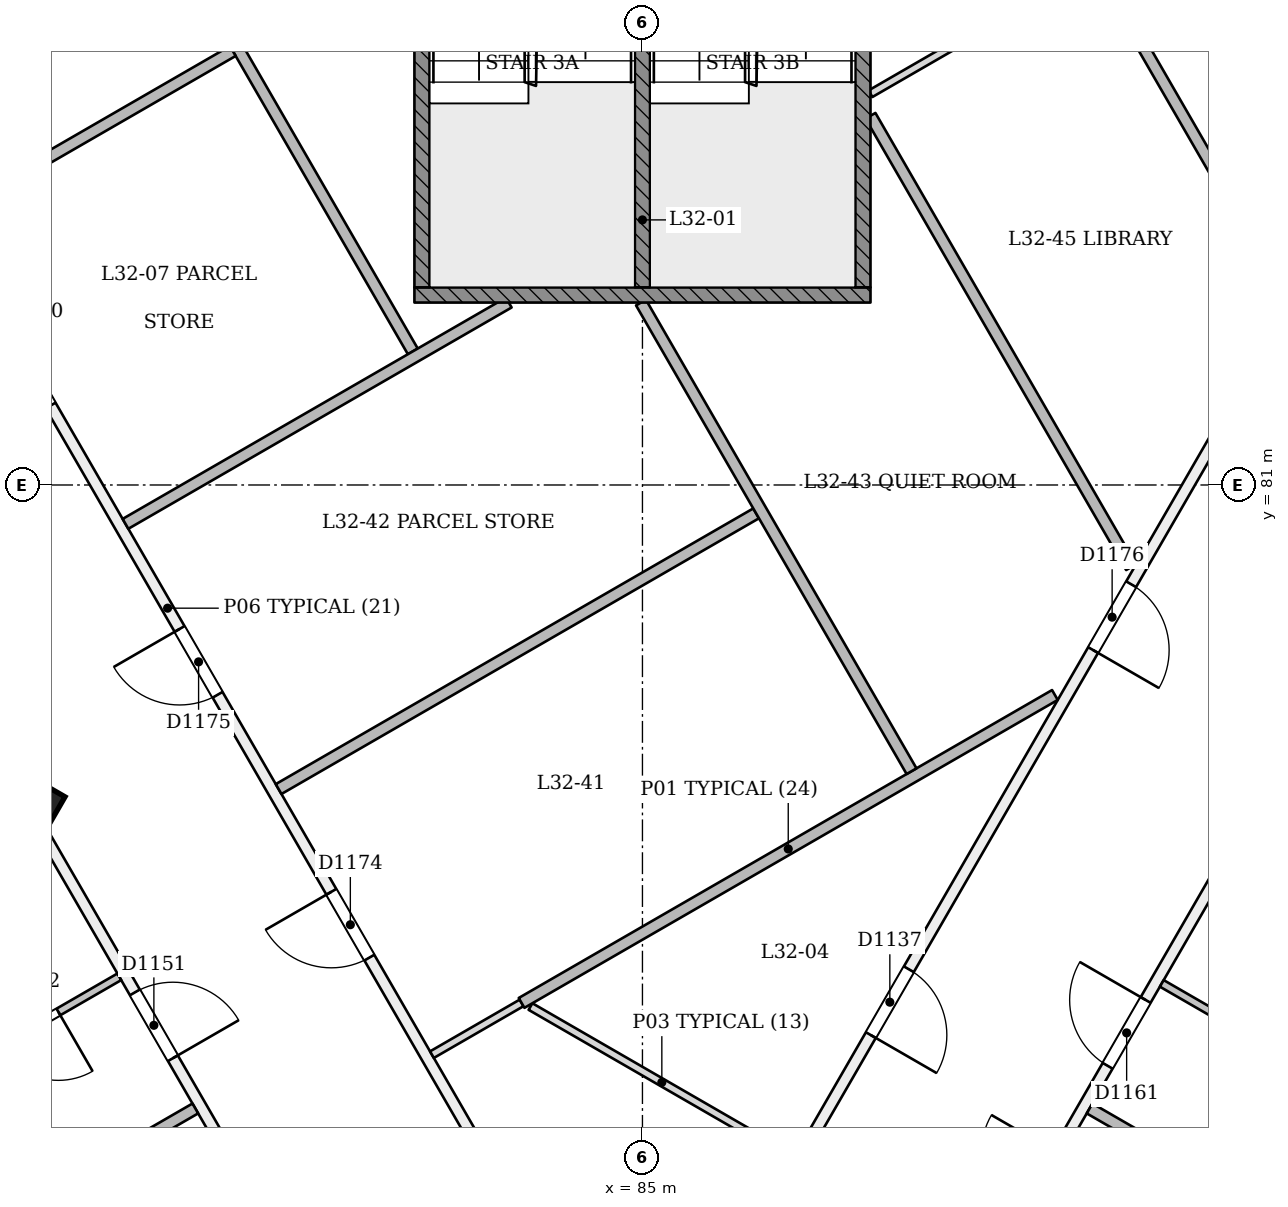
"""IFC4 building model, lengths in metres.
Left out: names, types, materials, properties, quantities, classifications, styles, units other than length and angle.
Written with IfcOpenShell. Run it as: python <this file> out.ifc"""

import sys

from ifc_helpers import new_model, si_unit, direction, frame, frame_2d, origin, origin_2d, place, context, subcontext, project, spatial, rectangle, extrude, element, fill, save


model = new_model("IFC4")
c1 = context("Model", 3, precision=1e-05, world=origin(), true_north=direction((0.0, 1.0)))
c2 = subcontext(c1, "Body", "Model", "MODEL_VIEW")
j1 = project(units=[si_unit("LENGTHUNIT", "METRE"), si_unit("PLANEANGLEUNIT", "RADIAN")], contexts=[c1])
p1 = place(None, origin())
s1 = spatial("IfcSite", under=j1, at=p1, CompositionType="ELEMENT")
p2 = place(p1, origin())
s2 = spatial("IfcBuilding", under=s1, at=p2, CompositionType="ELEMENT")
p3 = place(p2, frame((0.0, 0.0, 127.8)))
s3 = spatial("IfcBuildingStorey", under=s2, at=p3, CompositionType="ELEMENT", Elevation=127.8)
p4 = place(p3, frame((76.932, 76.731, -0.02), z_axis=(0.022221406801, 0.038413224561, 0.999014831351), x_axis=(-0.866021380218, -0.498527772566, 0.0384321348)))
e1 = element("IfcColumn", 1, at=p4, inside=s3, PredefinedType="COLUMN", context=c2, shape_type="SweptSolid", body=[
    extrude(rectangle(XDim=0.65, YDim=0.65, at=origin_2d()), origin(), (0.0, 0.0, 1.0), 3.604),
])
p5 = place(p3, frame((85.0, 68.559, 0.0), z_axis=(0.0, 0.0, 1.0), x_axis=(-0.499999561005, 0.866025657238, 0.0)))
e2 = element("IfcWall", 2, at=p5, inside=s3, PredefinedType="PARTITIONING", context=c2, shape_type="SweptSolid", body=[
    extrude(rectangle(XDim=24.989, YDim=0.15, at=frame_2d((12.495, 0.0))), origin(), (0.0, 0.0, 1.0), 3.15),
])
p6 = place(p5, frame((2.515, 0.0, 0.0)))
e3 = element("IfcOpeningElement", 3, at=p6, cuts=e2, PredefinedType="OPENING", context=c2, shape_type="SweptSolid", body=[
    extrude(rectangle(XDim=0.9, YDim=2.1, at=frame_2d((0.45, 1.05))), frame((0.0, 0.085, 0.0), z_axis=(0.0, -1.0, 0.0), x_axis=(1.0, 0.0, 0.0)), (0.0, 0.0, 1.0), 0.171),
])
p7 = place(p5, frame((15.573, 0.0, 0.0)))
e4 = element("IfcOpeningElement", 4, at=p7, cuts=e2, PredefinedType="OPENING", context=c2, shape_type="SweptSolid", body=[
    extrude(rectangle(XDim=1.0, YDim=2.1, at=frame_2d((0.5, 1.05))), frame((0.0, 0.085, 0.0), z_axis=(0.0, -1.0, 0.0), x_axis=(1.0, 0.0, 0.0)), (0.0, 0.0, 1.0), 0.171),
])
p8 = place(p5, frame((7.186, 0.0, 0.0)))
e5 = element("IfcOpeningElement", 5, at=p8, cuts=e2, PredefinedType="OPENING", context=c2, shape_type="SweptSolid", body=[
    extrude(rectangle(XDim=1.0, YDim=2.1, at=frame_2d((0.5, 1.05))), frame((0.0, 0.085, 0.0), z_axis=(0.0, -1.0, 0.0), x_axis=(1.0, 0.0, 0.0)), (0.0, 0.0, 1.0), 0.171),
])
p9 = place(p5, frame((11.179, 0.0, 0.0)))
e6 = element("IfcOpeningElement", 6, at=p9, cuts=e2, PredefinedType="OPENING", context=c2, shape_type="SweptSolid", body=[
    extrude(rectangle(XDim=1.0, YDim=2.1, at=frame_2d((0.5, 1.05))), frame((0.0, 0.085, 0.0), z_axis=(0.0, -1.0, 0.0), x_axis=(1.0, 0.0, 0.0)), (0.0, 0.0, 1.0), 0.171),
])
p10 = place(p5, frame((20.607, 0.0, 0.0)))
e7 = element("IfcOpeningElement", 7, at=p10, cuts=e2, PredefinedType="OPENING", context=c2, shape_type="SweptSolid", body=[
    extrude(rectangle(XDim=1.0, YDim=2.1, at=frame_2d((0.5, 1.05))), frame((0.0, 0.085, 0.0), z_axis=(0.0, -1.0, 0.0), x_axis=(1.0, 0.0, 0.0)), (0.0, 0.0, 1.0), 0.171),
])
p11 = place(p3, frame((97.495, 90.2, 0.0), z_axis=(0.0, 0.0, 1.0), x_axis=(-0.500000725976, -0.866024984641, 0.0)))
e8 = element("IfcWall", 8, at=p11, inside=s3, PredefinedType="PARTITIONING", context=c2, shape_type="SweptSolid", body=[
    extrude(rectangle(XDim=24.859, YDim=0.15, at=frame_2d((12.43, 0.0))), origin(), (0.0, 0.0, 1.0), 3.15),
])
p12 = place(p11, frame((17.98, 0.0, 0.0)))
e9 = element("IfcOpeningElement", 9, at=p12, cuts=e8, PredefinedType="OPENING", context=c2, shape_type="SweptSolid", body=[
    extrude(rectangle(XDim=1.0, YDim=2.1, at=frame_2d((0.5, 1.05))), frame((0.0, 0.085, 0.0), z_axis=(0.0, -1.0, 0.0), x_axis=(1.0, 0.0, 0.0)), (0.0, 0.0, 1.0), 0.171),
])
p13 = place(p11, frame((3.585, 0.0, 0.0)))
e10 = element("IfcOpeningElement", 10, at=p13, cuts=e8, PredefinedType="OPENING", context=c2, shape_type="SweptSolid", body=[
    extrude(rectangle(XDim=1.0, YDim=2.1, at=frame_2d((0.5, 1.05))), frame((0.0, 0.085, 0.0), z_axis=(0.0, -1.0, 0.0), x_axis=(1.0, 0.0, 0.0)), (0.0, 0.0, 1.0), 0.171),
])
p14 = place(p11, frame((12.131, 0.0, 0.0)))
e11 = element("IfcOpeningElement", 11, at=p14, cuts=e8, PredefinedType="OPENING", context=c2, shape_type="SweptSolid", body=[
    extrude(rectangle(XDim=1.0, YDim=2.1, at=frame_2d((0.5, 1.05))), frame((0.0, 0.085, 0.0), z_axis=(0.0, -1.0, 0.0), x_axis=(1.0, 0.0, 0.0)), (0.0, 0.0, 1.0), 0.171),
])
p15 = place(p11, frame((7.993, 0.0, 0.0)))
e12 = element("IfcOpeningElement", 12, at=p15, cuts=e8, PredefinedType="OPENING", context=c2, shape_type="SweptSolid", body=[
    extrude(rectangle(XDim=1.0, YDim=2.1, at=frame_2d((0.5, 1.05))), frame((0.0, 0.085, 0.0), z_axis=(0.0, -1.0, 0.0), x_axis=(1.0, 0.0, 0.0)), (0.0, 0.0, 1.0), 0.171),
])
p16 = place(p3, frame((64.534, 98.206, 0.0), z_axis=(0.0, 0.0, 1.0), x_axis=(0.499999603446, -0.866025632735, 0.0)))
e13 = element("IfcWall", 13, at=p16, inside=s3, PredefinedType="PARTITIONING", context=c2, shape_type="SweptSolid", body=[
    extrude(rectangle(XDim=40.592, YDim=0.15, at=frame_2d((20.296, 0.0))), origin(), (0.0, 0.0, 1.0), 2.75),
])
p17 = place(p16, frame((0.2, 0.0, 0.0)))
e14 = element("IfcOpeningElement", 14, at=p17, cuts=e13, PredefinedType="OPENING", context=c2, shape_type="SweptSolid", body=[
    extrude(rectangle(XDim=1.2, YDim=2.1, at=frame_2d((0.6, 1.05))), frame((0.0, 0.085, 0.0), z_axis=(0.0, -1.0, 0.0), x_axis=(1.0, 0.0, 0.0)), (0.0, 0.0, 1.0), 0.171),
])
p18 = place(p16, frame((3.016, 0.0, 0.0)))
e15 = element("IfcOpeningElement", 15, at=p18, cuts=e13, PredefinedType="OPENING", context=c2, shape_type="SweptSolid", body=[
    extrude(rectangle(XDim=1.0, YDim=2.1, at=frame_2d((0.5, 1.05))), frame((0.0, 0.085, 0.0), z_axis=(0.0, -1.0, 0.0), x_axis=(1.0, 0.0, 0.0)), (0.0, 0.0, 1.0), 0.171),
])
p19 = place(p16, frame((9.691, 0.0, 0.0)))
e16 = element("IfcOpeningElement", 16, at=p19, cuts=e13, PredefinedType="OPENING", context=c2, shape_type="SweptSolid", body=[
    extrude(rectangle(XDim=1.0, YDim=2.1, at=frame_2d((0.5, 1.05))), frame((0.0, 0.085, 0.0), z_axis=(0.0, -1.0, 0.0), x_axis=(1.0, 0.0, 0.0)), (0.0, 0.0, 1.0), 0.171),
])
p20 = place(p16, frame((11.901, 0.0, 0.0)))
e17 = element("IfcOpeningElement", 17, at=p20, cuts=e13, PredefinedType="OPENING", context=c2, shape_type="SweptSolid", body=[
    extrude(rectangle(XDim=1.0, YDim=2.1, at=frame_2d((0.5, 1.05))), frame((0.0, 0.085, 0.0), z_axis=(0.0, -1.0, 0.0), x_axis=(1.0, 0.0, 0.0)), (0.0, 0.0, 1.0), 0.171),
])
p21 = place(p16, frame((18.576, 0.0, 0.0)))
e18 = element("IfcOpeningElement", 18, at=p21, cuts=e13, PredefinedType="OPENING", context=c2, shape_type="SweptSolid", body=[
    extrude(rectangle(XDim=1.0, YDim=2.1, at=frame_2d((0.5, 1.05))), frame((0.0, 0.085, 0.0), z_axis=(0.0, -1.0, 0.0), x_axis=(1.0, 0.0, 0.0)), (0.0, 0.0, 1.0), 0.171),
])
p22 = place(p16, frame((22.046, 0.0, 0.0)))
e19 = element("IfcOpeningElement", 19, at=p22, cuts=e13, PredefinedType="OPENING", context=c2, shape_type="SweptSolid", body=[
    extrude(rectangle(XDim=1.0, YDim=2.1, at=frame_2d((0.5, 1.05))), frame((0.0, 0.085, 0.0), z_axis=(0.0, -1.0, 0.0), x_axis=(1.0, 0.0, 0.0)), (0.0, 0.0, 1.0), 0.171),
])
p23 = place(p16, frame((27.576, 0.0, 0.0)))
e20 = element("IfcOpeningElement", 20, at=p23, cuts=e13, PredefinedType="OPENING", context=c2, shape_type="SweptSolid", body=[
    extrude(rectangle(XDim=1.0, YDim=2.1, at=frame_2d((0.5, 1.05))), frame((0.0, 0.085, 0.0), z_axis=(0.0, -1.0, 0.0), x_axis=(1.0, 0.0, 0.0)), (0.0, 0.0, 1.0), 0.171),
])
p24 = place(p16, frame((31.046, 0.0, 0.0)))
e21 = element("IfcOpeningElement", 21, at=p24, cuts=e13, PredefinedType="OPENING", context=c2, shape_type="SweptSolid", body=[
    extrude(rectangle(XDim=1.0, YDim=2.1, at=frame_2d((0.5, 1.05))), frame((0.0, 0.085, 0.0), z_axis=(0.0, -1.0, 0.0), x_axis=(1.0, 0.0, 0.0)), (0.0, 0.0, 1.0), 0.171),
])
p25 = place(p16, frame((36.576, 0.0, 0.0)))
e22 = element("IfcOpeningElement", 22, at=p25, cuts=e13, PredefinedType="OPENING", context=c2, shape_type="SweptSolid", body=[
    extrude(rectangle(XDim=1.0, YDim=2.1, at=frame_2d((0.5, 1.05))), frame((0.0, 0.085, 0.0), z_axis=(0.0, -1.0, 0.0), x_axis=(1.0, 0.0, 0.0)), (0.0, 0.0, 1.0), 0.171),
])
p26 = place(p16, frame((39.323, 0.0, 0.0)))
e23 = element("IfcOpeningElement", 23, at=p26, cuts=e13, PredefinedType="OPENING", context=c2, shape_type="SweptSolid", body=[
    extrude(rectangle(XDim=1.0, YDim=2.1, at=frame_2d((0.5, 1.05))), frame((0.0, 0.085, 0.0), z_axis=(0.0, -1.0, 0.0), x_axis=(1.0, 0.0, 0.0)), (0.0, 0.0, 1.0), 0.171),
])
p27 = place(p3, frame((85.17, 63.052, 0.0), z_axis=(0.0, 0.0, 1.0), x_axis=(0.499999603446, 0.866025632735, 0.0)))
e24 = element("IfcWall", 24, at=p27, inside=s3, PredefinedType="PARTITIONING", context=c2, shape_type="SweptSolid", body=[
    extrude(rectangle(XDim=40.592, YDim=0.15, at=frame_2d((20.296, 0.0))), origin(), (0.0, 0.0, 1.0), 2.75),
])
p28 = place(p27, frame((0.273, 0.0, 0.0)))
e25 = element("IfcOpeningElement", 25, at=p28, cuts=e24, PredefinedType="OPENING", context=c2, shape_type="SweptSolid", body=[
    extrude(rectangle(XDim=1.2, YDim=2.1, at=frame_2d((0.6, 1.05))), frame((0.0, 0.085, 0.0), z_axis=(0.0, -1.0, 0.0), x_axis=(1.0, 0.0, 0.0)), (0.0, 0.0, 1.0), 0.171),
])
p29 = place(p27, frame((4.046, 0.0, 0.0)))
e26 = element("IfcOpeningElement", 26, at=p29, cuts=e24, PredefinedType="OPENING", context=c2, shape_type="SweptSolid", body=[
    extrude(rectangle(XDim=1.0, YDim=2.1, at=frame_2d((0.5, 1.05))), frame((0.0, 0.085, 0.0), z_axis=(0.0, -1.0, 0.0), x_axis=(1.0, 0.0, 0.0)), (0.0, 0.0, 1.0), 0.171),
])
p30 = place(p27, frame((9.576, 0.0, 0.0)))
e27 = element("IfcOpeningElement", 27, at=p30, cuts=e24, PredefinedType="OPENING", context=c2, shape_type="SweptSolid", body=[
    extrude(rectangle(XDim=1.0, YDim=2.1, at=frame_2d((0.5, 1.05))), frame((0.0, 0.085, 0.0), z_axis=(0.0, -1.0, 0.0), x_axis=(1.0, 0.0, 0.0)), (0.0, 0.0, 1.0), 0.171),
])
p31 = place(p27, frame((11.901, 0.0, 0.0)))
e28 = element("IfcOpeningElement", 28, at=p31, cuts=e24, PredefinedType="OPENING", context=c2, shape_type="SweptSolid", body=[
    extrude(rectangle(XDim=1.0, YDim=2.1, at=frame_2d((0.5, 1.05))), frame((0.0, 0.085, 0.0), z_axis=(0.0, -1.0, 0.0), x_axis=(1.0, 0.0, 0.0)), (0.0, 0.0, 1.0), 0.171),
])
p32 = place(p27, frame((18.691, 0.0, 0.0)))
e29 = element("IfcOpeningElement", 29, at=p32, cuts=e24, PredefinedType="OPENING", context=c2, shape_type="SweptSolid", body=[
    extrude(rectangle(XDim=1.0, YDim=2.1, at=frame_2d((0.5, 1.05))), frame((0.0, 0.085, 0.0), z_axis=(0.0, -1.0, 0.0), x_axis=(1.0, 0.0, 0.0)), (0.0, 0.0, 1.0), 0.171),
])
p33 = place(p27, frame((21.016, 0.0, 0.0)))
e30 = element("IfcOpeningElement", 30, at=p33, cuts=e24, PredefinedType="OPENING", context=c2, shape_type="SweptSolid", body=[
    extrude(rectangle(XDim=1.0, YDim=2.1, at=frame_2d((0.5, 1.05))), frame((0.0, 0.085, 0.0), z_axis=(0.0, -1.0, 0.0), x_axis=(1.0, 0.0, 0.0)), (0.0, 0.0, 1.0), 0.171),
])
p34 = place(p27, frame((27.576, 0.0, 0.0)))
e31 = element("IfcOpeningElement", 31, at=p34, cuts=e24, PredefinedType="OPENING", context=c2, shape_type="SweptSolid", body=[
    extrude(rectangle(XDim=1.0, YDim=2.1, at=frame_2d((0.5, 1.05))), frame((0.0, 0.085, 0.0), z_axis=(0.0, -1.0, 0.0), x_axis=(1.0, 0.0, 0.0)), (0.0, 0.0, 1.0), 0.171),
])
p35 = place(p27, frame((30.016, 0.0, 0.0)))
e32 = element("IfcOpeningElement", 32, at=p35, cuts=e24, PredefinedType="OPENING", context=c2, shape_type="SweptSolid", body=[
    extrude(rectangle(XDim=1.0, YDim=2.1, at=frame_2d((0.5, 1.05))), frame((0.0, 0.085, 0.0), z_axis=(0.0, -1.0, 0.0), x_axis=(1.0, 0.0, 0.0)), (0.0, 0.0, 1.0), 0.171),
])
p36 = place(p27, frame((39.192, 0.0, 0.0)))
e33 = element("IfcOpeningElement", 33, at=p36, cuts=e24, PredefinedType="OPENING", context=c2, shape_type="SweptSolid", body=[
    extrude(rectangle(XDim=1.2, YDim=2.1, at=frame_2d((0.6, 1.05))), frame((0.0, 0.085, 0.0), z_axis=(0.0, -1.0, 0.0), x_axis=(1.0, 0.0, 0.0)), (0.0, 0.0, 1.0), 0.171),
])
p37 = place(p3, frame((86.983, 72.143, 0.0), z_axis=(0.0, 0.0, 1.0), x_axis=(-0.866009324345, 0.500027849373, 0.0)))
e34 = element("IfcWall", 34, at=p37, inside=s3, PredefinedType="PARTITIONING", context=c2, shape_type="SweptSolid", body=[
    extrude(rectangle(XDim=3.99, YDim=0.1, at=frame_2d((1.995, 0.0))), origin(), (0.0, 0.0, 1.0), 3.15),
])
p38 = place(p3, frame((83.41, 74.186, 0.0), z_axis=(0.0, 0.0, 1.0), x_axis=(-0.86607212614, -0.499919065772, 0.0)))
e35 = element("IfcWall", 35, at=p38, inside=s3, PredefinedType="PARTITIONING", context=c2, shape_type="SweptSolid", body=[
    extrude(rectangle(XDim=1.362, YDim=0.1, at=frame_2d((0.681, 0.0))), origin(), (0.0, 0.0, 1.0), 3.15),
])
p39 = place(p3, frame((88.0, 86.147, 0.0), z_axis=(0.0, 0.0, 1.0), x_axis=(0.866017656312, 0.500013418776, 0.0)))
e36 = element("IfcWall", 36, at=p39, inside=s3, PredefinedType="PARTITIONING", context=c2, shape_type="SweptSolid", body=[
    extrude(rectangle(XDim=7.868, YDim=0.1, at=frame_2d((3.934, 0.0))), origin(), (0.0, 0.0, 1.0), 3.15),
])
p40 = place(p3, frame((90.426, 78.237, 0.0), z_axis=(0.0, 0.0, 1.0), x_axis=(-0.866018480059, -0.500011992053, 0.0)))
e37 = element("IfcWall", 37, at=p40, inside=s3, PredefinedType="PARTITIONING", context=c2, shape_type="SweptSolid", body=[
    extrude(rectangle(XDim=8.102, YDim=0.15, at=frame_2d((4.051, 0.0))), origin(), (0.0, 0.0, 1.0), 3.15),
])
p41 = place(p3, frame((77.747, 90.087, 0.0), z_axis=(0.0, 0.0, 1.0), x_axis=(0.5000170959, -0.866015533237, 0.0)))
e38 = element("IfcWall", 38, at=p41, inside=s3, PredefinedType="PARTITIONING", context=c2, shape_type="SweptSolid", body=[
    extrude(rectangle(XDim=8.464, YDim=0.15, at=frame_2d((4.232, 0.0))), origin(), (0.0, 0.0, 1.0), 3.15),
])
p42 = place(p3, frame((90.982, 87.811, 0.0), z_axis=(0.0, 0.0, 1.0), x_axis=(0.500022324899, -0.866012514114, 0.0)))
e39 = element("IfcWall", 39, at=p42, inside=s3, PredefinedType="PARTITIONING", context=c2, shape_type="SweptSolid", body=[
    extrude(rectangle(XDim=5.004, YDim=0.15, at=frame_2d((2.502, 0.0))), origin(), (0.0, 0.0, 1.0), 3.15),
])
p43 = place(p3, frame((78.199, 80.489, 0.0), z_axis=(0.0, 0.0, 1.0), x_axis=(0.86603616059, 0.499981368203, 0.0)))
e40 = element("IfcWall", 40, at=p43, inside=s3, PredefinedType="PARTITIONING", context=c2, shape_type="SweptSolid", body=[
    extrude(rectangle(XDim=5.823, YDim=0.15, at=frame_2d((2.911, 0.0))), origin(), (0.0, 0.0, 1.0), 3.15),
])
p44 = place(p3, frame((79.611, 86.709, 0.0), z_axis=(0.0, 0.0, 1.0), x_axis=(-0.866036406277, -0.499980942639, 0.0)))
e41 = element("IfcWall", 41, at=p44, inside=s3, PredefinedType="PARTITIONING", context=c2, shape_type="SweptSolid", body=[
    extrude(rectangle(XDim=4.333, YDim=0.15, at=frame_2d((2.167, 0.0))), origin(), (0.0, 0.0, 1.0), 3.15),
])
p45 = place(p3, frame((78.117, 74.53, 0.0), z_axis=(0.0, 0.0, 1.0), x_axis=(-0.866048868473, -0.499959355765, 0.0)))
e42 = element("IfcWall", 42, at=p45, inside=s3, PredefinedType="PARTITIONING", context=c2, shape_type="SweptSolid", body=[
    extrude(rectangle(XDim=2.825, YDim=0.1, at=frame_2d((1.413, 0.0))), origin(), (0.0, 0.0, 1.0), 3.15),
])
p46 = place(p45, frame((0.925, 0.0, 0.0)))
e43 = element("IfcOpeningElement", 43, at=p46, cuts=e42, PredefinedType="OPENING", context=c2, shape_type="SweptSolid", body=[
    extrude(rectangle(XDim=0.9, YDim=2.1, at=frame_2d((0.45, 1.05))), frame((0.0, 0.061, 0.0), z_axis=(0.0, -1.0, 0.0), x_axis=(1.0, 0.0, 0.0)), (0.0, 0.0, 1.0), 0.121),
])
for number, where, z_axis, x_axis in (
    (44, (73.622, 69.625, 0.0), (0.0, 0.0, 1.0), (0.866, 0.5, 0.0)),
    (45, (96.378, 69.625, 0.0), (0.0, 0.0, 1.0), (-0.866, 0.5, 0.0)),
):
    element("IfcWall", number, at=place(p3, frame(where, z_axis=z_axis, x_axis=x_axis)), inside=s3, PredefinedType="PARTITIONING", context=c2, shape_type="SweptSolid", body=[
        extrude(rectangle(XDim=6.345, YDim=0.15, at=frame_2d((3.173, 0.0))), origin(), (0.0, 0.0, 1.0), 2.65),
    ])
p47 = place(p3, frame((94.366, 72.98, 0.0), z_axis=(0.0, 0.0, 1.0), x_axis=(-0.86601045545, 0.500025890382, 0.0)))
e46 = element("IfcWall", 46, at=p47, inside=s3, PredefinedType="PARTITIONING", context=c2, shape_type="SweptSolid", body=[
    extrude(rectangle(XDim=2.925, YDim=0.1, at=frame_2d((1.462, 0.0))), origin(), (0.0, 0.0, 1.0), 3.15),
])
p48 = place(p3, frame((86.495, 80.627, 0.0), z_axis=(0.0, 0.0, 1.0), x_axis=(-0.866016326422, -0.500015722123, 0.0)))
e47 = element("IfcWall", 47, at=p48, inside=s3, PredefinedType="PARTITIONING", context=c2, shape_type="SweptSolid", body=[
    extrude(rectangle(XDim=7.254, YDim=0.15, at=frame_2d((3.627, 0.0))), origin(), (0.0, 0.0, 1.0), 3.15),
])
p49 = place(p3, frame((88.54, 77.235, 0.0), z_axis=(0.0, 0.0, 1.0), x_axis=(-0.500019316528, 0.866014251095, 0.0)))
e48 = element("IfcWall", 48, at=p49, inside=s3, PredefinedType="PARTITIONING", context=c2, shape_type="SweptSolid", body=[
    extrude(rectangle(XDim=7.119, YDim=0.15, at=frame_2d((3.56, 0.0))), origin(), (0.0, 0.0, 1.0), 3.15),
])
p50 = place(p3, frame((91.429, 79.918, 0.0), z_axis=(0.0, 0.0, 1.0), x_axis=(-0.499998790464, 0.86602610211, 0.0)))
e49 = element("IfcWall", 49, at=p50, inside=s3, PredefinedType="PARTITIONING", context=c2, shape_type="SweptSolid", body=[
    extrude(rectangle(XDim=6.857, YDim=0.15, at=frame_2d((3.429, 0.0))), origin(), (0.0, 0.0, 1.0), 3.15),
])
p51 = place(p3, frame((82.0, 83.5, 0.0), z_axis=(0.0, 0.0, 1.0), x_axis=(1.0, 0.0, 0.0)))
e50 = element("IfcWall", 50, at=p51, inside=s3, PredefinedType="SOLIDWALL", context=c2, shape_type="SweptSolid", body=[
    extrude(rectangle(XDim=6.0, YDim=0.2, at=frame_2d((3.0, 0.0))), origin(), (0.0, 0.0, 1.0), 3.15),
])
for number, where, z_axis, x_axis in (
    (51, (82.1, 83.6, 0.0), (0.0, 0.0, 1.0), (0.0, 1.0, 0.0)),
    (52, (87.9, 83.6, 0.0), (0.0, 0.0, 1.0), (0.0, 1.0, 0.0)),
    (53, (85.0, 83.6, 0.0), (0.0, 0.0, 1.0), (0.0, 1.0, 0.0)),
):
    element("IfcWall", number, at=place(p3, frame(where, z_axis=z_axis, x_axis=x_axis)), inside=s3, PredefinedType="SOLIDWALL", context=c2, shape_type="SweptSolid", body=[
        extrude(rectangle(XDim=6.8, YDim=0.2, at=frame_2d((3.4, 0.0))), origin(), (0.0, 0.0, 1.0), 3.15),
    ])
p52 = place(p12, origin())
e54 = element("IfcDoor", 54, at=p52, inside=s3, OperationType="SINGLE_SWING_RIGHT", PredefinedType="NOTDEFINED", context=c2, shape_type="SweptSolid", body=[
    extrude(rectangle(XDim=1.0, YDim=2.1, at=frame_2d((0.5, 1.05))), frame((0.0, 0.025, 0.0), z_axis=(0.0, -1.0, 0.0), x_axis=(1.0, 0.0, 0.0)), (0.0, 0.0, 1.0), 0.05),
])
fill(e9, e54)
p53 = place(p23, origin())
e55 = element("IfcDoor", 55, at=p53, inside=s3, OperationType="SINGLE_SWING_RIGHT", PredefinedType="NOTDEFINED", context=c2, shape_type="SweptSolid", body=[
    extrude(rectangle(XDim=1.0, YDim=2.1, at=frame_2d((0.5, 1.05))), frame((0.0, 0.025, 0.0), z_axis=(0.0, -1.0, 0.0), x_axis=(1.0, 0.0, 0.0)), (0.0, 0.0, 1.0), 0.05),
])
fill(e20, e55)
p54 = place(p46, origin())
e56 = element("IfcDoor", 56, at=p54, inside=s3, OperationType="SINGLE_SWING_LEFT", PredefinedType="NOTDEFINED", context=c2, shape_type="SweptSolid", body=[
    extrude(rectangle(XDim=0.9, YDim=2.1, at=frame_2d((0.45, 1.05))), frame((0.0, 0.025, 0.0), z_axis=(0.0, -1.0, 0.0), x_axis=(1.0, 0.0, 0.0)), (0.0, 0.0, 1.0), 0.05),
])
fill(e43, e56)
p55 = place(p31, origin())
e57 = element("IfcDoor", 57, at=p55, inside=s3, OperationType="SINGLE_SWING_RIGHT", PredefinedType="NOTDEFINED", context=c2, shape_type="SweptSolid", body=[
    extrude(rectangle(XDim=1.0, YDim=2.1, at=frame_2d((0.5, 1.05))), frame((0.0, 0.025, 0.0), z_axis=(0.0, -1.0, 0.0), x_axis=(1.0, 0.0, 0.0)), (0.0, 0.0, 1.0), 0.05),
])
fill(e28, e57)
p56 = place(p8, origin())
e58 = element("IfcDoor", 58, at=p56, inside=s3, OperationType="SINGLE_SWING_RIGHT", PredefinedType="NOTDEFINED", context=c2, shape_type="SweptSolid", body=[
    extrude(rectangle(XDim=1.0, YDim=2.1, at=frame_2d((0.5, 1.05))), frame((0.0, 0.025, 0.0), z_axis=(0.0, -1.0, 0.0), x_axis=(1.0, 0.0, 0.0)), (0.0, 0.0, 1.0), 0.05),
])
fill(e5, e58)
p57 = place(p9, origin())
e59 = element("IfcDoor", 59, at=p57, inside=s3, OperationType="SINGLE_SWING_RIGHT", PredefinedType="NOTDEFINED", context=c2, shape_type="SweptSolid", body=[
    extrude(rectangle(XDim=1.0, YDim=2.1, at=frame_2d((0.5, 1.05))), frame((0.0, 0.025, 0.0), z_axis=(0.0, -1.0, 0.0), x_axis=(1.0, 0.0, 0.0)), (0.0, 0.0, 1.0), 0.05),
])
fill(e6, e59)
p58 = place(p14, origin())
e60 = element("IfcDoor", 60, at=p58, inside=s3, OperationType="SINGLE_SWING_RIGHT", PredefinedType="NOTDEFINED", context=c2, shape_type="SweptSolid", body=[
    extrude(rectangle(XDim=1.0, YDim=2.1, at=frame_2d((0.5, 1.05))), frame((0.0, 0.025, 0.0), z_axis=(0.0, -1.0, 0.0), x_axis=(1.0, 0.0, 0.0)), (0.0, 0.0, 1.0), 0.05),
])
fill(e11, e60)
save(model, sys.argv[1])
